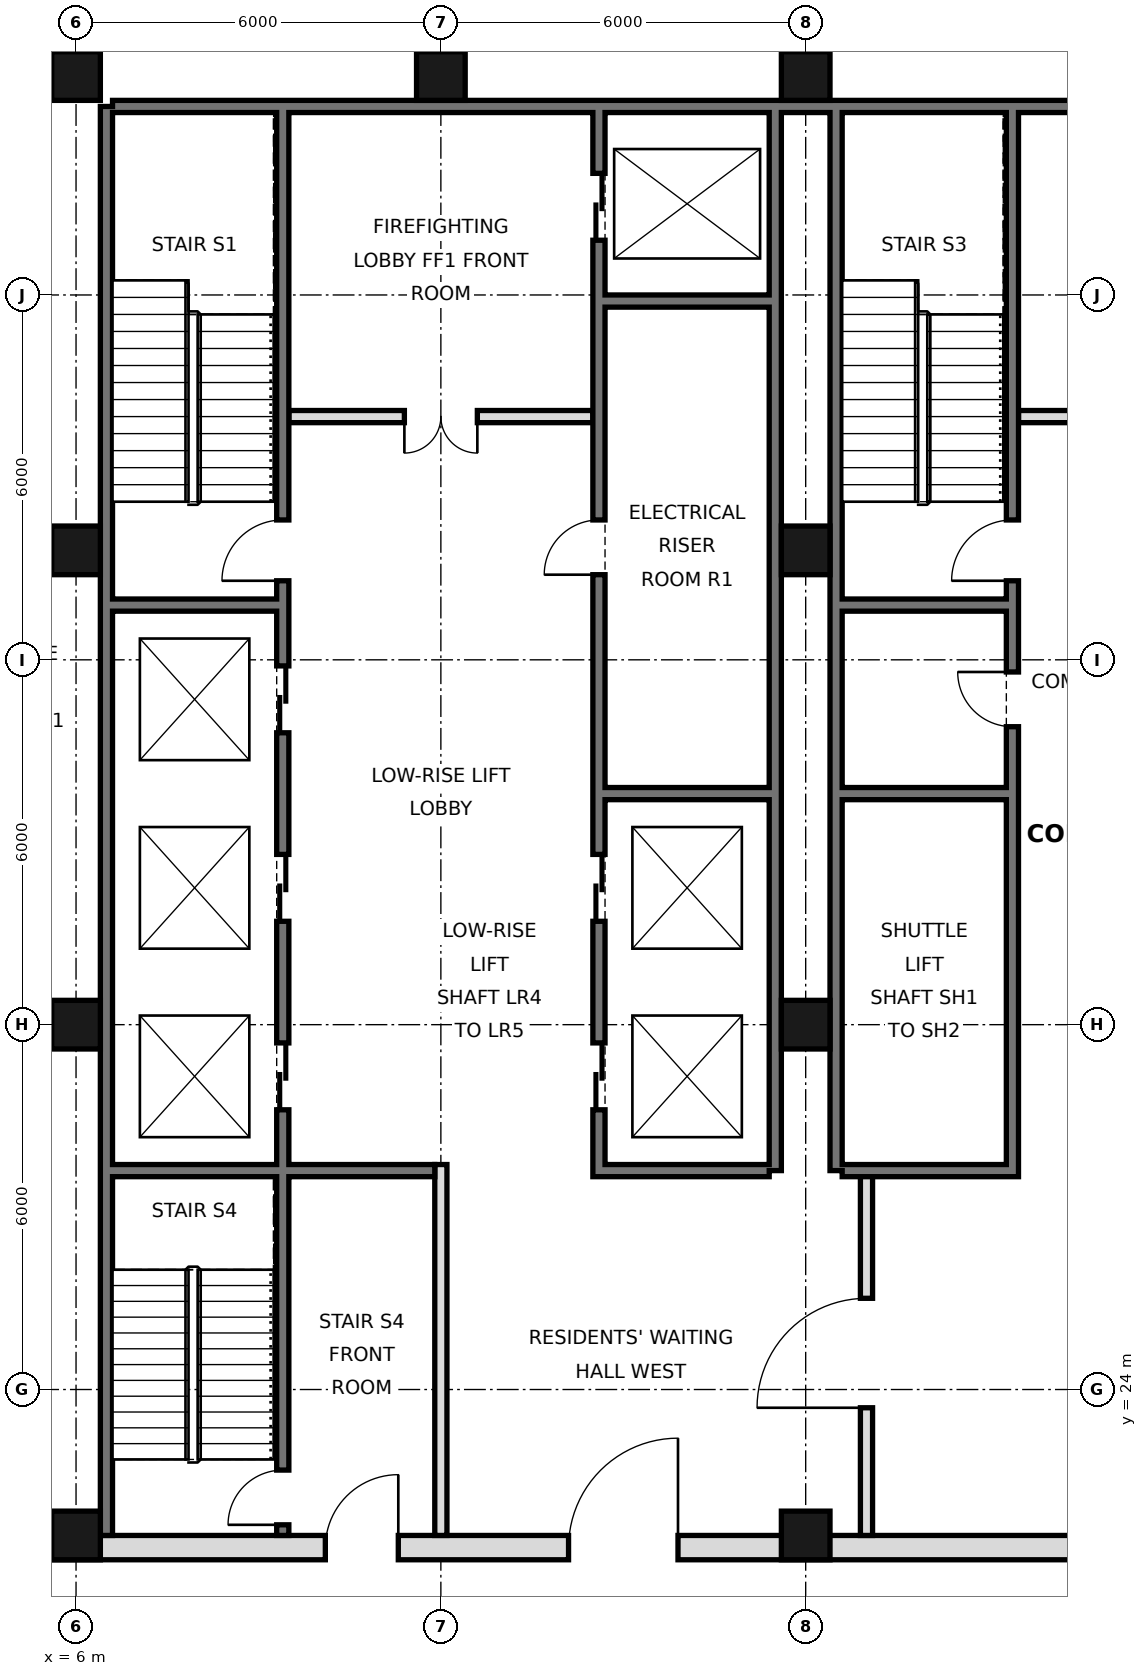
"""IFC4 building model, lengths in metres.
Left out: names, types, materials, properties, quantities, classifications, styles, units other than length and angle.
Written with IfcOpenShell. Run it as: python <this file> out.ifc"""

import sys

from ifc_helpers import new_model, si_unit, direction, frame, frame_2d, origin, origin_2d, place, context, subcontext, project, spatial, rectangle, hollow_rectangle, extrude, element, fill, save


model = new_model("IFC4")
c1 = context("Model", 3, precision=1e-05, world=origin(), true_north=direction((0.0, 1.0)))
c2 = subcontext(c1, "Body", "Model", "MODEL_VIEW")
j1 = project(units=[si_unit("LENGTHUNIT", "METRE"), si_unit("PLANEANGLEUNIT", "RADIAN")], contexts=[c1])
p1 = place(None, origin())
s1 = spatial("IfcSite", under=j1, at=p1, CompositionType="ELEMENT")
p2 = place(p1, origin())
s2 = spatial("IfcBuilding", under=s1, at=p2, CompositionType="ELEMENT")
p3 = place(p2, frame((0.0, 0.0, 85.8)))
s3 = spatial("IfcBuildingStorey", under=s2, at=p3, CompositionType="ELEMENT", Elevation=85.8)
for number, where, z_axis, x_axis in (
    (1, (6.0, 21.6, 0.0), (0.0, 0.0, 1.0), (1.0, 0.0, 0.0)),
    (2, (6.0, 30.0, 0.0), (0.0, 0.0, 1.0), (1.0, 0.0, 0.0)),
    (3, (6.0, 37.8, 0.0), (0.0, 0.0, 1.0), (1.0, 0.0, 0.0)),
    (4, (6.0, 45.6, 0.0), (0.0, 0.0, 1.0), (1.0, 0.0, 0.0)),
    (5, (12.0, 45.6, 0.0), (0.0, 0.0, 1.0), (1.0, 0.0, 0.0)),
    (6, (18.0, 21.6, 0.0), (0.0, 0.0, 1.0), (1.0, 0.0, 0.0)),
    (7, (18.0, 30.0, 0.0), (0.0, 0.0, 1.0), (1.0, 0.0, 0.0)),
    (8, (18.0, 37.8, 0.0), (0.0, 0.0, 1.0), (1.0, 0.0, 0.0)),
    (9, (18.0, 45.6, 0.0), (0.0, 0.0, 1.0), (1.0, 0.0, 0.0)),
):
    element("IfcColumn", number, at=place(p3, frame(where, z_axis=z_axis, x_axis=x_axis)), inside=s3, PredefinedType="COLUMN", context=c2, shape_type="SweptSolid", body=[
        extrude(hollow_rectangle(XDim=0.8, YDim=0.8, WallThickness=0.06, at=origin_2d()), origin(), (0.0, 0.0, 1.0), 4.4),
    ])
p4 = place(p3, frame((6.5, 21.6, 0.0), z_axis=(0.0, 0.0, 1.0), x_axis=(0.0, 1.0, 0.0)))
e10 = element("IfcWall", 10, at=p4, inside=s3, PredefinedType="SOLIDWALL", context=c2, shape_type="SweptSolid", body=[
    extrude(rectangle(XDim=23.5, YDim=0.2, at=frame_2d((11.75, 0.0))), origin(), (0.0, 0.0, 1.0), 4.1),
])
p5 = place(p3, frame((6.6, 45.1, 0.0), z_axis=(0.0, 0.0, 1.0), x_axis=(1.0, 0.0, 0.0)))
e11 = element("IfcWall", 11, at=p5, inside=s3, PredefinedType="SOLIDWALL", context=c2, shape_type="SweptSolid", body=[
    extrude(rectangle(XDim=34.8, YDim=0.2, at=frame_2d((17.4, 0.0))), origin(), (0.0, 0.0, 1.0), 4.1),
])
for number, where, z_axis, x_axis in (
    (12, (17.5, 27.6, 0.0), (0.0, 0.0, 1.0), (0.0, 1.0, 0.0)),
    (13, (18.5, 27.6, 0.0), (0.0, 0.0, 1.0), (0.0, 1.0, 0.0)),
):
    element("IfcWall", number, at=place(p3, frame(where, z_axis=z_axis, x_axis=x_axis)), inside=s3, PredefinedType="SOLIDWALL", context=c2, shape_type="SweptSolid", body=[
        extrude(rectangle(XDim=17.5, YDim=0.2, at=frame_2d((8.75, 0.0))), origin(), (0.0, 0.0, 1.0), 4.1),
    ])
p6 = place(p3, frame((5.6, 21.4, 0.0), z_axis=(0.0, 0.0, 1.0), x_axis=(1.0, 0.0, 0.0)))
e14 = element("IfcWall", 14, at=p6, inside=s3, PredefinedType="SOLIDWALL", context=c2, shape_type="SweptSolid", body=[
    extrude(rectangle(XDim=36.8, YDim=0.4, at=frame_2d((18.4, 0.0))), origin(), (0.0, 0.0, 1.0), 4.1),
])
p7 = place(p6, frame((8.5, 0.0, 0.0)))
e15 = element("IfcOpeningElement", 15, at=p7, cuts=e14, PredefinedType="OPENING", context=c2, shape_type="SweptSolid", body=[
    extrude(rectangle(XDim=1.8, YDim=2.1, at=frame_2d((0.9, 1.05))), frame((0.0, 0.21, 0.0), z_axis=(0.0, -1.0, 0.0), x_axis=(1.0, 0.0, 0.0)), (0.0, 0.0, 1.0), 0.42),
])
p8 = place(p6, frame((17.5, 0.0, 0.0)))
e16 = element("IfcOpeningElement", 16, at=p8, cuts=e14, PredefinedType="OPENING", context=c2, shape_type="SweptSolid", body=[
    extrude(rectangle(XDim=1.8, YDim=2.1, at=frame_2d((0.9, 1.05))), frame((0.0, 0.21, 0.0), z_axis=(0.0, -1.0, 0.0), x_axis=(1.0, 0.0, 0.0)), (0.0, 0.0, 1.0), 0.42),
])
p9 = place(p6, frame((26.5, 0.0, 0.0)))
e17 = element("IfcOpeningElement", 17, at=p9, cuts=e14, PredefinedType="OPENING", context=c2, shape_type="SweptSolid", body=[
    extrude(rectangle(XDim=1.8, YDim=2.1, at=frame_2d((0.9, 1.05))), frame((0.0, 0.21, 0.0), z_axis=(0.0, -1.0, 0.0), x_axis=(1.0, 0.0, 0.0)), (0.0, 0.0, 1.0), 0.42),
])
p10 = place(p6, frame((4.5, 0.0, 0.0)))
e18 = element("IfcOpeningElement", 18, at=p10, cuts=e14, PredefinedType="OPENING", context=c2, shape_type="SweptSolid", body=[
    extrude(rectangle(XDim=1.2, YDim=2.1, at=frame_2d((0.6, 1.05))), frame((0.0, 0.21, 0.0), z_axis=(0.0, -1.0, 0.0), x_axis=(1.0, 0.0, 0.0)), (0.0, 0.0, 1.0), 0.42),
])
p11 = place(p6, frame((31.1, 0.0, 0.0)))
e19 = element("IfcOpeningElement", 19, at=p11, cuts=e14, PredefinedType="OPENING", context=c2, shape_type="SweptSolid", body=[
    extrude(rectangle(XDim=1.2, YDim=2.1, at=frame_2d((0.6, 1.05))), frame((0.0, 0.21, 0.0), z_axis=(0.0, -1.0, 0.0), x_axis=(1.0, 0.0, 0.0)), (0.0, 0.0, 1.0), 0.42),
])
p12 = place(p3, frame((19.0, 21.6, 0.0), z_axis=(0.0, 0.0, 1.0), x_axis=(0.0, 1.0, 0.0)))
e20 = element("IfcWall", 20, at=p12, inside=s3, PredefinedType="PARTITIONING", context=c2, shape_type="SweptSolid", body=[
    extrude(rectangle(XDim=6.0, YDim=0.2, at=frame_2d((3.0, 0.0))), origin(), (0.0, 0.0, 1.0), 4.1),
])
p13 = place(p12, frame((2.1, 0.0, 0.0)))
e21 = element("IfcOpeningElement", 21, at=p13, cuts=e20, PredefinedType="OPENING", context=c2, shape_type="SweptSolid", body=[
    extrude(rectangle(XDim=1.8, YDim=2.1, at=frame_2d((0.9, 1.05))), frame((0.0, 0.11, 0.0), z_axis=(0.0, -1.0, 0.0), x_axis=(1.0, 0.0, 0.0)), (0.0, 0.0, 1.0), 0.22),
])
p14 = place(p3, frame((12.0, 21.6, 0.0), z_axis=(0.0, 0.0, 1.0), x_axis=(0.0, 1.0, 0.0)))
e22 = element("IfcWall", 22, at=p14, inside=s3, PredefinedType="PARTITIONING", context=c2, shape_type="SweptSolid", body=[
    extrude(rectangle(XDim=6.1, YDim=0.2, at=frame_2d((3.05, 0.0))), origin(), (0.0, 0.0, 1.0), 4.1),
])
p15 = place(p3, frame((14.6, 27.5, 0.0), z_axis=(0.0, 0.0, 1.0), x_axis=(0.0, 1.0, 0.0)))
e23 = element("IfcWall", 23, at=p15, inside=s3, PredefinedType="SOLIDWALL", context=c2, shape_type="SweptSolid", body=[
    extrude(rectangle(XDim=17.5, YDim=0.2, at=frame_2d((8.75, 0.0))), origin(), (0.0, 0.0, 1.0), 4.1),
])
p16 = place(p15, frame((1.1, 0.0, 0.0)))
e24 = element("IfcOpeningElement", 24, at=p16, cuts=e23, PredefinedType="OPENING", context=c2, shape_type="SweptSolid", body=[
    extrude(rectangle(XDim=1.1, YDim=2.1, at=frame_2d((0.55, 1.05))), frame((0.0, 0.11, 0.0), z_axis=(0.0, -1.0, 0.0), x_axis=(1.0, 0.0, 0.0)), (0.0, 0.0, 1.0), 0.22),
])
p17 = place(p15, frame((4.2, 0.0, 0.0)))
e25 = element("IfcOpeningElement", 25, at=p17, cuts=e23, PredefinedType="OPENING", context=c2, shape_type="SweptSolid", body=[
    extrude(rectangle(XDim=1.1, YDim=2.1, at=frame_2d((0.55, 1.05))), frame((0.0, 0.11, 0.0), z_axis=(0.0, -1.0, 0.0), x_axis=(1.0, 0.0, 0.0)), (0.0, 0.0, 1.0), 0.22),
])
p18 = place(p15, frame((15.4, 0.0, 0.0)))
e26 = element("IfcOpeningElement", 26, at=p18, cuts=e23, PredefinedType="OPENING", context=c2, shape_type="SweptSolid", body=[
    extrude(rectangle(XDim=1.1, YDim=2.1, at=frame_2d((0.55, 1.05))), frame((0.0, 0.11, 0.0), z_axis=(0.0, -1.0, 0.0), x_axis=(1.0, 0.0, 0.0)), (0.0, 0.0, 1.0), 0.22),
])
p19 = place(p15, frame((9.9, 0.0, 0.0)))
e27 = element("IfcOpeningElement", 27, at=p19, cuts=e23, PredefinedType="OPENING", context=c2, shape_type="SweptSolid", body=[
    extrude(rectangle(XDim=0.9, YDim=2.1, at=frame_2d((0.45, 1.05))), frame((0.0, 0.11, 0.0), z_axis=(0.0, -1.0, 0.0), x_axis=(1.0, 0.0, 0.0)), (0.0, 0.0, 1.0), 0.22),
])
p20 = place(p3, frame((21.4, 27.5, 0.0), z_axis=(0.0, 0.0, 1.0), x_axis=(0.0, 1.0, 0.0)))
e28 = element("IfcWall", 28, at=p20, inside=s3, PredefinedType="SOLIDWALL", context=c2, shape_type="SweptSolid", body=[
    extrude(rectangle(XDim=17.5, YDim=0.2, at=frame_2d((8.75, 0.0))), origin(), (0.0, 0.0, 1.0), 4.1),
])
p21 = place(p20, frame((9.8, 0.0, 0.0)))
e29 = element("IfcOpeningElement", 29, at=p21, cuts=e28, PredefinedType="OPENING", context=c2, shape_type="SweptSolid", body=[
    extrude(rectangle(XDim=1.0, YDim=2.1, at=frame_2d((0.5, 1.05))), frame((0.0, 0.11, 0.0), z_axis=(0.0, -1.0, 0.0), x_axis=(1.0, 0.0, 0.0)), (0.0, 0.0, 1.0), 0.22),
])
p22 = place(p20, frame((7.4, 0.0, 0.0)))
e30 = element("IfcOpeningElement", 30, at=p22, cuts=e28, PredefinedType="OPENING", context=c2, shape_type="SweptSolid", body=[
    extrude(rectangle(XDim=0.9, YDim=2.1, at=frame_2d((0.45, 1.05))), frame((0.0, 0.11, 0.0), z_axis=(0.0, -1.0, 0.0), x_axis=(1.0, 0.0, 0.0)), (0.0, 0.0, 1.0), 0.22),
])
p23 = place(p3, frame((9.4, 21.6, 0.0), z_axis=(0.0, 0.0, 1.0), x_axis=(0.0, 1.0, 0.0)))
e31 = element("IfcWall", 31, at=p23, inside=s3, PredefinedType="SOLIDWALL", context=c2, shape_type="SweptSolid", body=[
    extrude(rectangle(XDim=23.4, YDim=0.2, at=frame_2d((11.7, 0.0))), origin(), (0.0, 0.0, 1.0), 4.1),
])
p24 = place(p23, frame((7.0, 0.0, 0.0)))
e32 = element("IfcOpeningElement", 32, at=p24, cuts=e31, PredefinedType="OPENING", context=c2, shape_type="SweptSolid", body=[
    extrude(rectangle(XDim=1.1, YDim=2.1, at=frame_2d((0.55, 1.05))), frame((0.0, 0.11, 0.0), z_axis=(0.0, -1.0, 0.0), x_axis=(1.0, 0.0, 0.0)), (0.0, 0.0, 1.0), 0.22),
])
p25 = place(p23, frame((10.1, 0.0, 0.0)))
e33 = element("IfcOpeningElement", 33, at=p25, cuts=e31, PredefinedType="OPENING", context=c2, shape_type="SweptSolid", body=[
    extrude(rectangle(XDim=1.1, YDim=2.1, at=frame_2d((0.55, 1.05))), frame((0.0, 0.11, 0.0), z_axis=(0.0, -1.0, 0.0), x_axis=(1.0, 0.0, 0.0)), (0.0, 0.0, 1.0), 0.22),
])
p26 = place(p23, frame((13.2, 0.0, 0.0)))
e34 = element("IfcOpeningElement", 34, at=p26, cuts=e31, PredefinedType="OPENING", context=c2, shape_type="SweptSolid", body=[
    extrude(rectangle(XDim=1.1, YDim=2.1, at=frame_2d((0.55, 1.05))), frame((0.0, 0.11, 0.0), z_axis=(0.0, -1.0, 0.0), x_axis=(1.0, 0.0, 0.0)), (0.0, 0.0, 1.0), 0.22),
])
p27 = place(p23, frame((15.7, 0.0, 0.0)))
e35 = element("IfcOpeningElement", 35, at=p27, cuts=e31, PredefinedType="OPENING", context=c2, shape_type="SweptSolid", body=[
    extrude(rectangle(XDim=1.0, YDim=2.1, at=frame_2d((0.5, 1.05))), frame((0.0, 0.11, 0.0), z_axis=(0.0, -1.0, 0.0), x_axis=(1.0, 0.0, 0.0)), (0.0, 0.0, 1.0), 0.22),
])
p28 = place(p23, frame((0.175, 0.0, 0.0)))
e36 = element("IfcOpeningElement", 36, at=p28, cuts=e31, PredefinedType="OPENING", context=c2, shape_type="SweptSolid", body=[
    extrude(rectangle(XDim=0.9, YDim=2.1, at=frame_2d((0.45, 1.05))), frame((0.0, 0.11, 0.0), z_axis=(0.0, -1.0, 0.0), x_axis=(1.0, 0.0, 0.0)), (0.0, 0.0, 1.0), 0.22),
])
for number, where, z_axis, x_axis in (
    (37, (14.7, 27.6, 0.0), (0.0, 0.0, 1.0), (1.0, 0.0, 0.0)),
    (38, (18.6, 27.6, 0.0), (0.0, 0.0, 1.0), (1.0, 0.0, 0.0)),
):
    element("IfcWall", number, at=place(p3, frame(where, z_axis=z_axis, x_axis=x_axis)), inside=s3, PredefinedType="SOLIDWALL", context=c2, shape_type="SweptSolid", body=[
        extrude(rectangle(XDim=2.7, YDim=0.2, at=frame_2d((1.35, 0.0))), origin(), (0.0, 0.0, 1.0), 4.1),
    ])
p29 = place(p3, frame((6.6, 27.6, 0.0), z_axis=(0.0, 0.0, 1.0), x_axis=(1.0, 0.0, 0.0)))
e39 = element("IfcWall", 39, at=p29, inside=s3, PredefinedType="SOLIDWALL", context=c2, shape_type="SweptSolid", body=[
    extrude(rectangle(XDim=5.3, YDim=0.2, at=frame_2d((2.65, 0.0))), origin(), (0.0, 0.0, 1.0), 4.1),
])
for number, where, z_axis, x_axis in (
    (40, (14.7, 33.8, 0.0), (0.0, 0.0, 1.0), (1.0, 0.0, 0.0)),
    (41, (18.6, 33.8, 0.0), (0.0, 0.0, 1.0), (1.0, 0.0, 0.0)),
    (42, (18.6, 36.9, 0.0), (0.0, 0.0, 1.0), (1.0, 0.0, 0.0)),
    (43, (6.6, 36.9, 0.0), (0.0, 0.0, 1.0), (1.0, 0.0, 0.0)),
):
    element("IfcWall", number, at=place(p3, frame(where, z_axis=z_axis, x_axis=x_axis)), inside=s3, PredefinedType="SOLIDWALL", context=c2, shape_type="SweptSolid", body=[
        extrude(rectangle(XDim=2.7, YDim=0.2, at=frame_2d((1.35, 0.0))), origin(), (0.0, 0.0, 1.0), 4.1),
    ])
p30 = place(p3, frame((21.5, 40.0, 0.0), z_axis=(0.0, 0.0, 1.0), x_axis=(1.0, 0.0, 0.0)))
e44 = element("IfcWall", 44, at=p30, inside=s3, PredefinedType="PARTITIONING", context=c2, shape_type="SweptSolid", body=[
    extrude(rectangle(XDim=5.0, YDim=0.2, at=frame_2d((2.5, 0.0))), origin(), (0.0, 0.0, 1.0), 4.1),
])
p31 = place(p30, frame((1.9, 0.0, 0.0)))
e45 = element("IfcOpeningElement", 45, at=p31, cuts=e44, PredefinedType="OPENING", context=c2, shape_type="SweptSolid", body=[
    extrude(rectangle(XDim=1.2, YDim=2.1, at=frame_2d((0.6, 1.05))), frame((0.0, 0.11, 0.0), z_axis=(0.0, -1.0, 0.0), x_axis=(1.0, 0.0, 0.0)), (0.0, 0.0, 1.0), 0.22),
])
p32 = place(p3, frame((9.5, 40.0, 0.0), z_axis=(0.0, 0.0, 1.0), x_axis=(1.0, 0.0, 0.0)))
e46 = element("IfcWall", 46, at=p32, inside=s3, PredefinedType="PARTITIONING", context=c2, shape_type="SweptSolid", body=[
    extrude(rectangle(XDim=5.0, YDim=0.2, at=frame_2d((2.5, 0.0))), origin(), (0.0, 0.0, 1.0), 4.1),
])
p33 = place(p32, frame((1.9, 0.0, 0.0)))
e47 = element("IfcOpeningElement", 47, at=p33, cuts=e46, PredefinedType="OPENING", context=c2, shape_type="SweptSolid", body=[
    extrude(rectangle(XDim=1.2, YDim=2.1, at=frame_2d((0.6, 1.05))), frame((0.0, 0.11, 0.0), z_axis=(0.0, -1.0, 0.0), x_axis=(1.0, 0.0, 0.0)), (0.0, 0.0, 1.0), 0.22),
])
p34 = place(p3, frame((14.7, 41.9, 0.0), z_axis=(0.0, 0.0, 1.0), x_axis=(1.0, 0.0, 0.0)))
e48 = element("IfcWall", 48, at=p34, inside=s3, PredefinedType="SOLIDWALL", context=c2, shape_type="SweptSolid", body=[
    extrude(rectangle(XDim=2.7, YDim=0.2, at=frame_2d((1.35, 0.0))), origin(), (0.0, 0.0, 1.0), 4.1),
])
p35 = place(p7, frame((1.8, 0.0, 0.0), z_axis=(0.0, 0.0, 1.0), x_axis=(-1.0, 0.0, 0.0)))
e49 = element("IfcDoor", 49, at=p35, inside=s3, OperationType="SINGLE_SWING_LEFT", PredefinedType="DOOR", context=c2, shape_type="SweptSolid", body=[
    extrude(rectangle(XDim=1.8, YDim=2.1, at=frame_2d((0.9, 1.05))), frame((0.0, 0.025, 0.0), z_axis=(0.0, -1.0, 0.0), x_axis=(1.0, 0.0, 0.0)), (0.0, 0.0, 1.0), 0.05),
])
fill(e15, e49)
p36 = place(p13, origin())
e50 = element("IfcDoor", 50, at=p36, inside=s3, OperationType="SINGLE_SWING_LEFT", PredefinedType="DOOR", context=c2, shape_type="SweptSolid", body=[
    extrude(rectangle(XDim=1.8, YDim=2.1, at=frame_2d((0.9, 1.05))), frame((0.0, 0.025, 0.0), z_axis=(0.0, -1.0, 0.0), x_axis=(1.0, 0.0, 0.0)), (0.0, 0.0, 1.0), 0.05),
])
fill(e21, e50)
p37 = place(p10, frame((1.2, 0.0, 0.0), z_axis=(0.0, 0.0, 1.0), x_axis=(-1.0, 0.0, 0.0)))
e51 = element("IfcDoor", 51, at=p37, inside=s3, OperationType="SINGLE_SWING_LEFT", PredefinedType="DOOR", context=c2, shape_type="SweptSolid", body=[
    extrude(rectangle(XDim=1.2, YDim=2.1, at=frame_2d((0.6, 1.05))), frame((0.0, 0.025, 0.0), z_axis=(0.0, -1.0, 0.0), x_axis=(1.0, 0.0, 0.0)), (0.0, 0.0, 1.0), 0.05),
])
fill(e18, e51)
p38 = place(p33, frame((1.2, 0.0, 0.0), z_axis=(0.0, 0.0, 1.0), x_axis=(-1.0, 0.0, 0.0)))
e52 = element("IfcDoor", 52, at=p38, inside=s3, OperationType="DOUBLE_DOOR_SINGLE_SWING", PredefinedType="DOOR", context=c2, shape_type="SweptSolid", body=[
    extrude(rectangle(XDim=1.2, YDim=2.1, at=frame_2d((0.6, 1.05))), frame((0.0, 0.025, 0.0), z_axis=(0.0, -1.0, 0.0), x_axis=(1.0, 0.0, 0.0)), (0.0, 0.0, 1.0), 0.05),
])
fill(e47, e52)
p39 = place(p16, origin())
e53 = element("IfcDoor", 53, at=p39, inside=s3, OperationType="DOUBLE_DOOR_SLIDING", PredefinedType="DOOR", context=c2, shape_type="SweptSolid", body=[
    extrude(rectangle(XDim=1.1, YDim=2.1, at=frame_2d((0.55, 1.05))), frame((0.0, 0.025, 0.0), z_axis=(0.0, -1.0, 0.0), x_axis=(1.0, 0.0, 0.0)), (0.0, 0.0, 1.0), 0.05),
])
fill(e24, e53)
p40 = place(p17, origin())
e54 = element("IfcDoor", 54, at=p40, inside=s3, OperationType="DOUBLE_DOOR_SLIDING", PredefinedType="DOOR", context=c2, shape_type="SweptSolid", body=[
    extrude(rectangle(XDim=1.1, YDim=2.1, at=frame_2d((0.55, 1.05))), frame((0.0, 0.025, 0.0), z_axis=(0.0, -1.0, 0.0), x_axis=(1.0, 0.0, 0.0)), (0.0, 0.0, 1.0), 0.05),
])
fill(e25, e54)
p41 = place(p18, origin())
e55 = element("IfcDoor", 55, at=p41, inside=s3, OperationType="DOUBLE_DOOR_SLIDING", PredefinedType="DOOR", context=c2, shape_type="SweptSolid", body=[
    extrude(rectangle(XDim=1.1, YDim=2.1, at=frame_2d((0.55, 1.05))), frame((0.0, 0.025, 0.0), z_axis=(0.0, -1.0, 0.0), x_axis=(1.0, 0.0, 0.0)), (0.0, 0.0, 1.0), 0.05),
])
fill(e26, e55)
p42 = place(p24, origin())
e56 = element("IfcDoor", 56, at=p42, inside=s3, OperationType="DOUBLE_DOOR_SLIDING", PredefinedType="DOOR", context=c2, shape_type="SweptSolid", body=[
    extrude(rectangle(XDim=1.1, YDim=2.1, at=frame_2d((0.55, 1.05))), frame((0.0, 0.025, 0.0), z_axis=(0.0, -1.0, 0.0), x_axis=(1.0, 0.0, 0.0)), (0.0, 0.0, 1.0), 0.05),
])
fill(e32, e56)
p43 = place(p25, origin())
e57 = element("IfcDoor", 57, at=p43, inside=s3, OperationType="DOUBLE_DOOR_SLIDING", PredefinedType="DOOR", context=c2, shape_type="SweptSolid", body=[
    extrude(rectangle(XDim=1.1, YDim=2.1, at=frame_2d((0.55, 1.05))), frame((0.0, 0.025, 0.0), z_axis=(0.0, -1.0, 0.0), x_axis=(1.0, 0.0, 0.0)), (0.0, 0.0, 1.0), 0.05),
])
fill(e33, e57)
p44 = place(p26, origin())
e58 = element("IfcDoor", 58, at=p44, inside=s3, OperationType="DOUBLE_DOOR_SLIDING", PredefinedType="DOOR", context=c2, shape_type="SweptSolid", body=[
    extrude(rectangle(XDim=1.1, YDim=2.1, at=frame_2d((0.55, 1.05))), frame((0.0, 0.025, 0.0), z_axis=(0.0, -1.0, 0.0), x_axis=(1.0, 0.0, 0.0)), (0.0, 0.0, 1.0), 0.05),
])
fill(e34, e58)
p45 = place(p27, origin())
e59 = element("IfcDoor", 59, at=p45, inside=s3, OperationType="SINGLE_SWING_LEFT", PredefinedType="DOOR", context=c2, shape_type="SweptSolid", body=[
    extrude(rectangle(XDim=1.0, YDim=2.1, at=frame_2d((0.5, 1.05))), frame((0.0, 0.025, 0.0), z_axis=(0.0, -1.0, 0.0), x_axis=(1.0, 0.0, 0.0)), (0.0, 0.0, 1.0), 0.05),
])
fill(e35, e59)
p46 = place(p21, origin())
e60 = element("IfcDoor", 60, at=p46, inside=s3, OperationType="SINGLE_SWING_LEFT", PredefinedType="DOOR", context=c2, shape_type="SweptSolid", body=[
    extrude(rectangle(XDim=1.0, YDim=2.1, at=frame_2d((0.5, 1.05))), frame((0.0, 0.025, 0.0), z_axis=(0.0, -1.0, 0.0), x_axis=(1.0, 0.0, 0.0)), (0.0, 0.0, 1.0), 0.05),
])
fill(e29, e60)
p47 = place(p28, origin())
e61 = element("IfcDoor", 61, at=p47, inside=s3, OperationType="SINGLE_SWING_LEFT", PredefinedType="DOOR", context=c2, shape_type="SweptSolid", body=[
    extrude(rectangle(XDim=0.9, YDim=2.1, at=frame_2d((0.45, 1.05))), frame((0.0, 0.025, 0.0), z_axis=(0.0, -1.0, 0.0), x_axis=(1.0, 0.0, 0.0)), (0.0, 0.0, 1.0), 0.05),
])
fill(e36, e61)
p48 = place(p19, origin())
e62 = element("IfcDoor", 62, at=p48, inside=s3, OperationType="SINGLE_SWING_LEFT", PredefinedType="DOOR", context=c2, shape_type="SweptSolid", body=[
    extrude(rectangle(XDim=0.9, YDim=2.1, at=frame_2d((0.45, 1.05))), frame((0.0, 0.025, 0.0), z_axis=(0.0, -1.0, 0.0), x_axis=(1.0, 0.0, 0.0)), (0.0, 0.0, 1.0), 0.05),
])
fill(e27, e62)
p49 = place(p22, frame((0.9, 0.0, 0.0), z_axis=(0.0, 0.0, 1.0), x_axis=(-1.0, 0.0, 0.0)))
e63 = element("IfcDoor", 63, at=p49, inside=s3, OperationType="SINGLE_SWING_LEFT", PredefinedType="DOOR", context=c2, shape_type="SweptSolid", body=[
    extrude(rectangle(XDim=0.9, YDim=2.1, at=frame_2d((0.45, 1.05))), frame((0.0, 0.025, 0.0), z_axis=(0.0, -1.0, 0.0), x_axis=(1.0, 0.0, 0.0)), (0.0, 0.0, 1.0), 0.05),
])
fill(e30, e63)
save(model, sys.argv[1])
